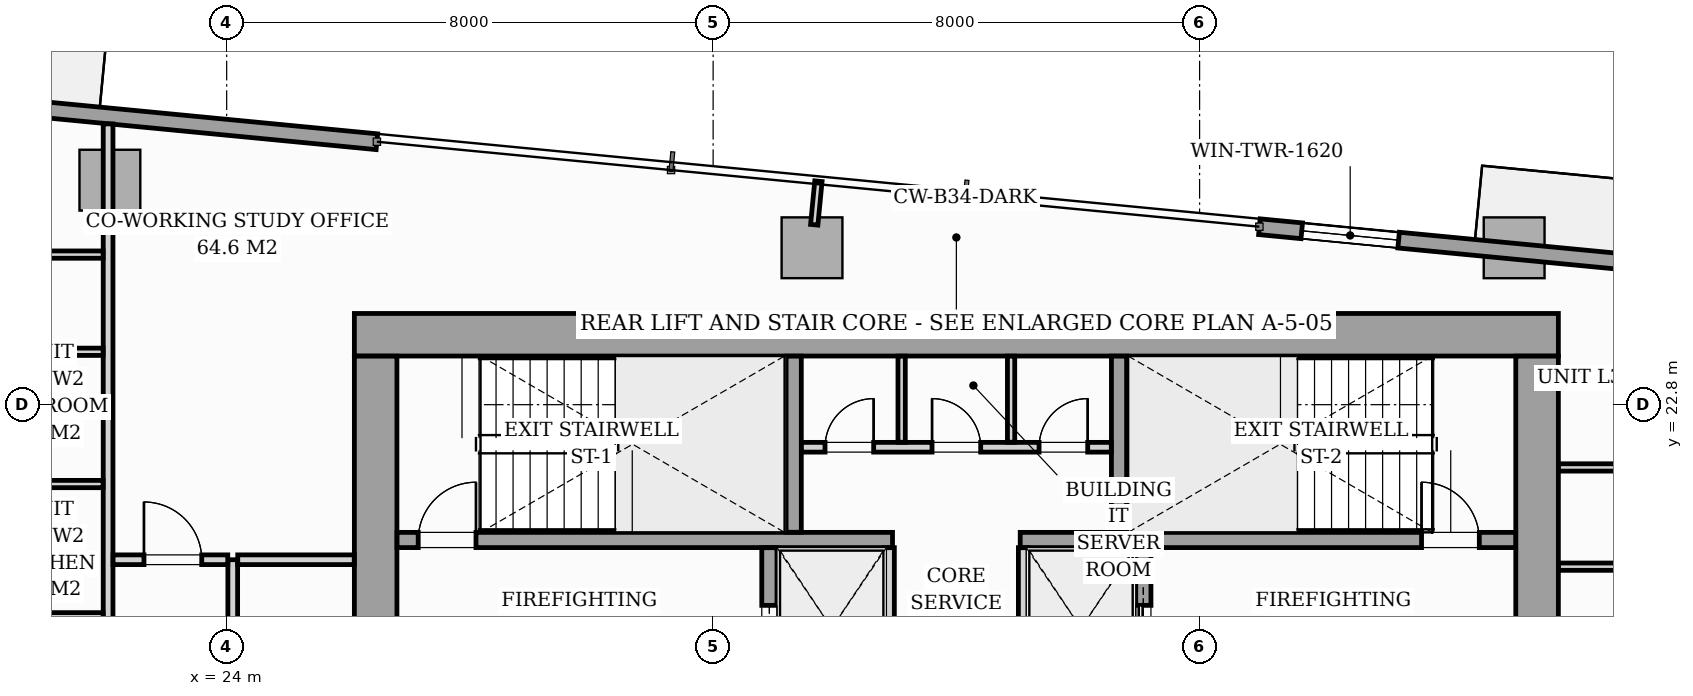
"""IFC4 building model, lengths in metres.
Left out: names, types, materials, properties, quantities, classifications, styles, units other than length and angle.
Written with IfcOpenShell. Run it as: python <this file> out.ifc"""

import sys

from ifc_helpers import new_model, si_unit, direction, frame, frame_2d, origin, origin_2d, place, context, subcontext, project, spatial, rectangle, i_section, extrude, source, transform, mapped, element, fill, save


model = new_model("IFC4")
c1 = context("Model", 3, precision=1e-05, world=origin(), true_north=direction((0.0, 1.0)))
c2 = subcontext(c1, "Body", "Model", "MODEL_VIEW")
j1 = project(units=[si_unit("LENGTHUNIT", "METRE"), si_unit("PLANEANGLEUNIT", "RADIAN")], contexts=[c1])
p1 = place(None, origin())
s1 = spatial("IfcSite", under=j1, at=p1, CompositionType="ELEMENT")
p2 = place(p1, origin())
s2 = spatial("IfcBuilding", under=s1, at=p2, CompositionType="ELEMENT")
p3 = place(p2, frame((0.0, 0.0, 137.4)))
s3 = spatial("IfcBuildingStorey", under=s2, at=p3, CompositionType="ELEMENT", Elevation=137.4)
m1 = source(origin(), c2, "Body", "SweptSolid", [
    extrude(i_section(OverallWidth=0.421, OverallDepth=0.465, WebThickness=0.045, FlangeThickness=0.073, FilletRadius=0.018, at=origin_2d()), origin(), (0.0, 0.0, 1.0), 3.196),
])
for number, where, z_axis, x_axis in (
    (1, (26.4, 24.0, 0.002), (0.0, 0.0, 1.0), (1.0, 0.0, 0.0)),
    (2, (33.12, 24.0, 0.002), (0.0, 0.0, 1.0), (1.0, 0.0, 0.0)),
    (3, (38.88, 24.0, 0.002), (0.0, 0.0, 1.0), (1.0, 0.0, 0.0)),
    (4, (45.6, 24.0, 0.002), (0.0, 0.0, 1.0), (1.0, 0.0, 0.0)),
):
    element("IfcColumn", number, at=place(p3, frame(where, z_axis=z_axis, x_axis=x_axis)), inside=s3, PredefinedType="PILASTER", context=c2, shape_type="MappedRepresentation", body=[
        mapped(m1, transform((0.0, 0.0, 0.0), scale=1.0)),
    ])
m2 = source(origin(), c2, "Body", "SweptSolid", [
    extrude(rectangle(XDim=1.0, YDim=1.0, at=origin_2d()), origin(), (0.0, 0.0, 1.0), 3.196),
])
for number, where, z_axis, x_axis in (
    (5, (22.08, 26.492, 0.002), (0.0, 0.0, 1.0), (0.995, -0.096, 0.0)),
    (6, (33.626, 25.38, 0.002), (0.0, 0.0, 1.0), (0.995, -0.096, 0.0)),
    (7, (45.173, 25.38, 0.002), (0.0, 0.0, 1.0), (0.995, -0.096, 0.0)),
):
    element("IfcColumn", number, at=place(p3, frame(where, z_axis=z_axis, x_axis=x_axis)), inside=s3, PredefinedType="COLUMN", context=c2, shape_type="MappedRepresentation", body=[
        mapped(m2, transform((0.0, 0.0, 0.0), scale=1.0)),
    ])
p4 = place(p3, frame((9.539, 28.754, 0.0), z_axis=(0.0, 0.0, 1.0), x_axis=(0.995397345886, -0.09583383433, 0.0)))
e8 = element("IfcWall", 8, at=p4, inside=s3, PredefinedType="STANDARD", context=c2, shape_type="SweptSolid", body=[
    extrude(rectangle(XDim=17.01, YDim=0.26, at=frame_2d((8.505, 0.0))), origin(), (0.0, 0.0, 1.0), 2.94),
])
p5 = place(p4, frame((5.759, 0.0, 0.0)))
e9 = element("IfcOpeningElement", 9, at=p5, cuts=e8, PredefinedType="OPENING", context=c2, shape_type="SweptSolid", body=[
    extrude(rectangle(XDim=1.8, YDim=2.06, at=frame_2d((0.9, 1.03))), frame((0.0, 0.14, 0.0), z_axis=(0.0, -1.0, 0.0), x_axis=(1.0, 0.0, 0.0)), (0.0, 0.0, 1.0), 0.28),
])
p6 = place(p4, frame((2.05, 0.0, 0.65)))
e10 = element("IfcOpeningElement", 10, at=p6, cuts=e8, PredefinedType="OPENING", context=c2, shape_type="SweptSolid", body=[
    extrude(rectangle(XDim=1.6, YDim=1.5, at=frame_2d((0.8, 0.75))), frame((0.0, 0.14, 0.0), z_axis=(0.0, -1.0, 0.0), x_axis=(1.0, 0.0, 0.0)), (0.0, 0.0, 1.0), 0.28),
])
p7 = place(p3, frame((40.983, 25.727, 0.0), z_axis=(0.0, 0.0, 1.0), x_axis=(0.995395844771, -0.095849424686, 0.0)))
e11 = element("IfcWall", 11, at=p7, inside=s3, PredefinedType="STANDARD", context=c2, shape_type="SweptSolid", body=[
    extrude(rectangle(XDim=17.01, YDim=0.26, at=frame_2d((8.505, 0.0))), origin(), (0.0, 0.0, 1.0), 2.94),
])
p8 = place(p7, frame((8.79, 0.0, 0.0)))
e12 = element("IfcOpeningElement", 12, at=p8, cuts=e11, PredefinedType="OPENING", context=c2, shape_type="SweptSolid", body=[
    extrude(rectangle(XDim=1.8, YDim=2.06, at=frame_2d((0.9, 1.03))), frame((0.0, 0.14, 0.0), z_axis=(0.0, -1.0, 0.0), x_axis=(1.0, 0.0, 0.0)), (0.0, 0.0, 1.0), 0.28),
])
p9 = place(p7, frame((0.7, 0.0, 0.65)))
e13 = element("IfcOpeningElement", 13, at=p9, cuts=e11, PredefinedType="OPENING", context=c2, shape_type="SweptSolid", body=[
    extrude(rectangle(XDim=1.6, YDim=1.5, at=frame_2d((0.8, 0.75))), frame((0.0, 0.14, 0.0), z_axis=(0.0, -1.0, 0.0), x_axis=(1.0, 0.0, 0.0)), (0.0, 0.0, 1.0), 0.28),
])
p10 = place(p3, frame((26.1, 23.95, 0.0), z_axis=(0.0, 0.0, 1.0), x_axis=(1.0, 0.0, 0.0)))
e14 = element("IfcWall", 14, at=p10, inside=s3, PredefinedType="SHEAR", context=c2, shape_type="SweptSolid", body=[
    extrude(rectangle(XDim=19.8, YDim=0.7, at=frame_2d((9.9, 0.0))), origin(), (0.0, 0.0, 1.0), 3.2),
])
for number, where, z_axis, x_axis in (
    (15, (26.45, 17.802, 0.0), (0.0, 0.0, 1.0), (0.0, 1.0, 0.0)),
    (16, (45.55, 17.802, 0.0), (0.0, 0.0, 1.0), (0.0, 1.0, 0.0)),
):
    element("IfcWall", number, at=place(p3, frame(where, z_axis=z_axis, x_axis=x_axis)), inside=s3, PredefinedType="SHEAR", context=c2, shape_type="SweptSolid", body=[
        extrude(rectangle(XDim=5.796, YDim=0.7, at=frame_2d((2.898, 0.0))), origin(), (0.0, 0.0, 1.0), 3.2),
    ])
p11 = place(p3, frame((26.802, 20.575, 0.0), z_axis=(0.0, 0.0, 1.0), x_axis=(1.0, 0.0, 0.0)))
e17 = element("IfcWall", 17, at=p11, inside=s3, PredefinedType="SOLIDWALL", context=c2, shape_type="SweptSolid", body=[
    extrude(rectangle(XDim=8.148, YDim=0.25, at=frame_2d((4.074, 0.0))), origin(), (0.0, 0.0, 1.0), 3.2),
])
p12 = place(p11, frame((0.348, 0.0, 0.0)))
e18 = element("IfcOpeningElement", 18, at=p12, cuts=e17, PredefinedType="OPENING", context=c2, shape_type="SweptSolid", body=[
    extrude(rectangle(XDim=0.95, YDim=2.06, at=frame_2d((0.475, 1.03))), frame((0.0, 0.135, 0.0), z_axis=(0.0, -1.0, 0.0), x_axis=(1.0, 0.0, 0.0)), (0.0, 0.0, 1.0), 0.27),
])
p13 = place(p3, frame((37.05, 20.575, 0.0), z_axis=(0.0, 0.0, 1.0), x_axis=(1.0, 0.0, 0.0)))
e19 = element("IfcWall", 19, at=p13, inside=s3, PredefinedType="SOLIDWALL", context=c2, shape_type="SweptSolid", body=[
    extrude(rectangle(XDim=8.148, YDim=0.25, at=frame_2d((4.074, 0.0))), origin(), (0.0, 0.0, 1.0), 3.2),
])
p14 = place(p13, frame((6.6, 0.0, 0.0)))
e20 = element("IfcOpeningElement", 20, at=p14, cuts=e19, PredefinedType="OPENING", context=c2, shape_type="SweptSolid", body=[
    extrude(rectangle(XDim=0.95, YDim=2.06, at=frame_2d((0.475, 1.03))), frame((0.0, 0.135, 0.0), z_axis=(0.0, -1.0, 0.0), x_axis=(1.0, 0.0, 0.0)), (0.0, 0.0, 1.0), 0.27),
])
for number, where, z_axis, x_axis in (
    (21, (33.325, 20.702, 0.0), (0.0, 0.0, 1.0), (0.0, 1.0, 0.0)),
    (22, (38.675, 20.702, 0.0), (0.0, 0.0, 1.0), (0.0, 1.0, 0.0)),
):
    element("IfcWall", number, at=place(p3, frame(where, z_axis=z_axis, x_axis=x_axis)), inside=s3, PredefinedType="SOLIDWALL", context=c2, shape_type="SweptSolid", body=[
        extrude(rectangle(XDim=2.896, YDim=0.25, at=frame_2d((1.448, 0.0))), origin(), (0.0, 0.0, 1.0), 3.2),
    ])
p15 = place(p3, frame((32.925, 17.802, 0.0), z_axis=(0.0, 0.0, 1.0), x_axis=(0.0, 1.0, 0.0)))
e23 = element("IfcWall", 23, at=p15, inside=s3, PredefinedType="SOLIDWALL", context=c2, shape_type="SweptSolid", body=[
    extrude(rectangle(XDim=2.646, YDim=0.25, at=frame_2d((1.323, 0.0))), origin(), (0.0, 0.0, 1.0), 3.2),
])
p16 = place(p15, frame((0.598, 0.0, 0.0)))
e24 = element("IfcOpeningElement", 24, at=p16, cuts=e23, PredefinedType="OPENING", context=c2, shape_type="SweptSolid", body=[
    extrude(rectangle(XDim=1.1, YDim=2.08, at=frame_2d((0.55, 1.04))), frame((0.0, 0.135, 0.0), z_axis=(0.0, -1.0, 0.0), x_axis=(1.0, 0.0, 0.0)), (0.0, 0.0, 1.0), 0.27),
])
for number, where, z_axis, x_axis in (
    (25, (34.9, 17.802, 0.0), (0.0, 0.0, 1.0), (0.0, 1.0, 0.0)),
    (26, (37.1, 17.802, 0.0), (0.0, 0.0, 1.0), (0.0, 1.0, 0.0)),
):
    element("IfcWall", number, at=place(p3, frame(where, z_axis=z_axis, x_axis=x_axis)), inside=s3, PredefinedType="PARTITIONING", context=c2, shape_type="SweptSolid", body=[
        extrude(rectangle(XDim=2.646, YDim=0.16, at=frame_2d((1.323, 0.0))), origin(), (0.0, 0.0, 1.0), 2.94),
    ])
p17 = place(p3, frame((39.075, 17.802, 0.0), z_axis=(0.0, 0.0, 1.0), x_axis=(0.0, 1.0, 0.0)))
e27 = element("IfcWall", 27, at=p17, inside=s3, PredefinedType="SOLIDWALL", context=c2, shape_type="SweptSolid", body=[
    extrude(rectangle(XDim=2.646, YDim=0.25, at=frame_2d((1.323, 0.0))), origin(), (0.0, 0.0, 1.0), 3.2),
])
p18 = place(p17, frame((0.598, 0.0, 0.0)))
e28 = element("IfcOpeningElement", 28, at=p18, cuts=e27, PredefinedType="OPENING", context=c2, shape_type="SweptSolid", body=[
    extrude(rectangle(XDim=1.1, YDim=2.08, at=frame_2d((0.55, 1.04))), frame((0.0, 0.135, 0.0), z_axis=(0.0, -1.0, 0.0), x_axis=(1.0, 0.0, 0.0)), (0.0, 0.0, 1.0), 0.27),
])
p19 = place(p3, frame((33.452, 22.1, 0.0), z_axis=(0.0, 0.0, 1.0), x_axis=(1.0, 0.0, 0.0)))
e29 = element("IfcWall", 29, at=p19, inside=s3, PredefinedType="PARTITIONING", context=c2, shape_type="SweptSolid", body=[
    extrude(rectangle(XDim=5.096, YDim=0.16, at=frame_2d((2.548, 0.0))), origin(), (0.0, 0.0, 1.0), 2.94),
])
p20 = place(p19, frame((0.388, 0.0, 0.0)))
e30 = element("IfcOpeningElement", 30, at=p20, cuts=e29, PredefinedType="OPENING", context=c2, shape_type="SweptSolid", body=[
    extrude(rectangle(XDim=0.8, YDim=2.05, at=frame_2d((0.4, 1.025))), frame((0.0, 0.09, 0.0), z_axis=(0.0, -1.0, 0.0), x_axis=(1.0, 0.0, 0.0)), (0.0, 0.0, 1.0), 0.18),
])
p21 = place(p19, frame((2.148, 0.0, 0.0)))
e31 = element("IfcOpeningElement", 31, at=p21, cuts=e29, PredefinedType="OPENING", context=c2, shape_type="SweptSolid", body=[
    extrude(rectangle(XDim=0.8, YDim=2.05, at=frame_2d((0.4, 1.025))), frame((0.0, 0.09, 0.0), z_axis=(0.0, -1.0, 0.0), x_axis=(1.0, 0.0, 0.0)), (0.0, 0.0, 1.0), 0.18),
])
p22 = place(p19, frame((3.908, 0.0, 0.0)))
e32 = element("IfcOpeningElement", 32, at=p22, cuts=e29, PredefinedType="OPENING", context=c2, shape_type="SweptSolid", body=[
    extrude(rectangle(XDim=0.8, YDim=2.05, at=frame_2d((0.4, 1.025))), frame((0.0, 0.09, 0.0), z_axis=(0.0, -1.0, 0.0), x_axis=(1.0, 0.0, 0.0)), (0.0, 0.0, 1.0), 0.18),
])
for number, where, z_axis, x_axis in (
    (33, (35.1, 22.182, 0.0), (0.0, 0.0, 1.0), (0.0, 1.0, 0.0)),
    (34, (36.9, 22.182, 0.0), (0.0, 0.0, 1.0), (0.0, 1.0, 0.0)),
):
    element("IfcWall", number, at=place(p3, frame(where, z_axis=z_axis, x_axis=x_axis)), inside=s3, PredefinedType="PARTITIONING", context=c2, shape_type="SweptSolid", body=[
        extrude(rectangle(XDim=1.416, YDim=0.12, at=frame_2d((0.708, 0.0))), origin(), (0.0, 0.0, 1.0), 2.94),
    ])
p23 = place(p3, frame((22.05, 12.732, 0.0), z_axis=(0.0, 0.0, 1.0), x_axis=(0.0, 1.0, 0.0)))
e35 = element("IfcWall", 35, at=p23, inside=s3, PredefinedType="PARTITIONING", context=c2, shape_type="SweptSolid", body=[
    extrude(rectangle(XDim=14.685, YDim=0.16, at=frame_2d((7.343, 0.0))), origin(), (0.0, 0.0, 1.0), 2.94),
])
p24 = place(p23, frame((0.493, 0.0, 0.0)))
e36 = element("IfcOpeningElement", 36, at=p24, cuts=e35, PredefinedType="OPENING", context=c2, shape_type="SweptSolid", body=[
    extrude(rectangle(XDim=0.95, YDim=2.06, at=frame_2d((0.475, 1.03))), frame((0.0, 0.09, 0.0), z_axis=(0.0, -1.0, 0.0), x_axis=(1.0, 0.0, 0.0)), (0.0, 0.0, 1.0), 0.18),
])
p25 = place(p23, frame((5.313, 0.0, 0.0)))
e37 = element("IfcOpeningElement", 37, at=p25, cuts=e35, PredefinedType="OPENING", context=c2, shape_type="SweptSolid", body=[
    extrude(rectangle(XDim=0.85, YDim=2.0, at=frame_2d((0.425, 1.0))), frame((0.0, 0.09, 0.0), z_axis=(0.0, -1.0, 0.0), x_axis=(1.0, 0.0, 0.0)), (0.0, 0.0, 1.0), 0.18),
])
for number, where, z_axis, x_axis in (
    (38, (19.712, 21.495, 0.0), (0.0, 0.0, 1.0), (1.0, 0.0, 0.0)),
    (39, (19.712, 19.32, 0.0), (0.0, 0.0, 1.0), (1.0, 0.0, 0.0)),
    (40, (19.712, 23.67, 0.0), (0.0, 0.0, 1.0), (1.0, 0.0, 0.0)),
):
    element("IfcWall", number, at=place(p3, frame(where, z_axis=z_axis, x_axis=x_axis)), inside=s3, PredefinedType="PARTITIONING", context=c2, shape_type="SweptSolid", body=[
        extrude(rectangle(XDim=2.256, YDim=0.12, at=frame_2d((1.128, 0.0))), origin(), (0.0, 0.0, 1.0), 2.94),
    ])
p26 = place(p3, frame((14.426, 25.268, 0.0), z_axis=(0.0, 0.0, 1.0), x_axis=(1.0, 0.0, 0.0)))
e41 = element("IfcWall", 41, at=p26, inside=s3, PredefinedType="PARTITIONING", context=c2, shape_type="SweptSolid", body=[
    extrude(rectangle(XDim=7.542, YDim=0.12, at=frame_2d((3.771, 0.0))), origin(), (0.0, 0.0, 1.0), 2.94),
])
p27 = place(p26, frame((3.316, 0.0, 0.0)))
e42 = element("IfcOpeningElement", 42, at=p27, cuts=e41, PredefinedType="OPENING", context=c2, shape_type="SweptSolid", body=[
    extrude(rectangle(XDim=0.85, YDim=2.05, at=frame_2d((0.425, 1.025))), frame((0.0, 0.07, 0.0), z_axis=(0.0, -1.0, 0.0), x_axis=(1.0, 0.0, 0.0)), (0.0, 0.0, 1.0), 0.14),
])
p28 = place(p3, frame((45.902, 21.768, 0.0), z_axis=(0.0, 0.0, 1.0), x_axis=(1.0, 0.0, 0.0)))
e43 = element("IfcWall", 43, at=p28, inside=s3, PredefinedType="PARTITIONING", context=c2, shape_type="SweptSolid", body=[
    extrude(rectangle(XDim=12.781, YDim=0.12, at=frame_2d((6.391, 0.0))), origin(), (0.0, 0.0, 1.0), 2.94),
])
p29 = place(p28, frame((6.146, 0.0, 0.0)))
e44 = element("IfcOpeningElement", 44, at=p29, cuts=e43, PredefinedType="OPENING", context=c2, shape_type="SweptSolid", body=[
    extrude(rectangle(XDim=0.85, YDim=2.05, at=frame_2d((0.425, 1.025))), frame((0.0, 0.07, 0.0), z_axis=(0.0, -1.0, 0.0), x_axis=(1.0, 0.0, 0.0)), (0.0, 0.0, 1.0), 0.14),
])
p30 = place(p3, frame((45.902, 20.136, 0.0), z_axis=(0.0, 0.0, 1.0), x_axis=(1.0, 0.0, 0.0)))
e45 = element("IfcWall", 45, at=p30, inside=s3, PredefinedType="PARTITIONING", context=c2, shape_type="SweptSolid", body=[
    extrude(rectangle(XDim=14.063, YDim=0.12, at=frame_2d((7.031, 0.0))), origin(), (0.0, 0.0, 1.0), 2.94),
])
p31 = place(p30, frame((6.708, 0.0, 0.0)))
e46 = element("IfcOpeningElement", 46, at=p31, cuts=e45, PredefinedType="OPENING", context=c2, shape_type="SweptSolid", body=[
    extrude(rectangle(XDim=0.85, YDim=2.05, at=frame_2d((0.425, 1.025))), frame((0.0, 0.07, 0.0), z_axis=(0.0, -1.0, 0.0), x_axis=(1.0, 0.0, 0.0)), (0.0, 0.0, 1.0), 0.14),
])
p32 = place(p3, frame((24.1, 14.66, 0.0), z_axis=(0.0, 0.0, 1.0), x_axis=(0.0, 1.0, 0.0)))
e47 = element("IfcWall", 47, at=p32, inside=s3, PredefinedType="PARTITIONING", context=c2, shape_type="SweptSolid", body=[
    extrude(rectangle(XDim=5.59, YDim=0.16, at=frame_2d((2.795, 0.0))), origin(), (0.0, 0.0, 1.0), 2.94),
])
p33 = place(p32, frame((2.36, 0.0, 0.0)))
e48 = element("IfcOpeningElement", 48, at=p33, cuts=e47, PredefinedType="OPENING", context=c2, shape_type="SweptSolid", body=[
    extrude(rectangle(XDim=0.85, YDim=2.0, at=frame_2d((0.425, 1.0))), frame((0.0, 0.09, 0.0), z_axis=(0.0, -1.0, 0.0), x_axis=(1.0, 0.0, 0.0)), (0.0, 0.0, 1.0), 0.18),
])
p34 = place(p3, frame((22.132, 20.25, 0.0), z_axis=(0.0, 0.0, 1.0), x_axis=(1.0, 0.0, 0.0)))
e49 = element("IfcWall", 49, at=p34, inside=s3, PredefinedType="PARTITIONING", context=c2, shape_type="SweptSolid", body=[
    extrude(rectangle(XDim=1.886, YDim=0.16, at=frame_2d((0.943, 0.0))), origin(), (0.0, 0.0, 1.0), 2.94),
])
p35 = place(p34, frame((0.508, 0.0, 0.0)))
e50 = element("IfcOpeningElement", 50, at=p35, cuts=e49, PredefinedType="OPENING", context=c2, shape_type="SweptSolid", body=[
    extrude(rectangle(XDim=0.95, YDim=2.06, at=frame_2d((0.475, 1.03))), frame((0.0, 0.09, 0.0), z_axis=(0.0, -1.0, 0.0), x_axis=(1.0, 0.0, 0.0)), (0.0, 0.0, 1.0), 0.18),
])
p36 = place(p3, frame((24.182, 20.25, 0.0), z_axis=(0.0, 0.0, 1.0), x_axis=(1.0, 0.0, 0.0)))
e51 = element("IfcWall", 51, at=p36, inside=s3, PredefinedType="PARTITIONING", context=c2, shape_type="SweptSolid", body=[
    extrude(rectangle(XDim=1.916, YDim=0.16, at=frame_2d((0.958, 0.0))), origin(), (0.0, 0.0, 1.0), 2.94),
])
p37 = place(p3, frame((33.663, 25.759, 0.0), z_axis=(0.0, 0.0, 1.0), x_axis=(0.095977354523, 0.995383517755, 0.0)))
e52 = element("IfcWall", 52, at=p37, inside=s3, PredefinedType="PARTITIONING", context=c2, shape_type="SweptSolid", body=[
    extrude(rectangle(XDim=0.72, YDim=0.12, at=frame_2d((0.36, 0.0))), origin(), (0.0, 0.0, 1.0), 2.94),
])
m3 = source(origin(), c2, "Body", "SweptSolid", [
    extrude(rectangle(XDim=1.6, YDim=1.5, at=frame_2d((0.8, 0.75))), frame((0.0, 0.03, 0.0), z_axis=(0.0, -1.0, 0.0), x_axis=(1.0, 0.0, 0.0)), (0.0, 0.0, 1.0), 0.06),
])
p38 = place(p9, origin())
e53 = element("IfcWindow", 53, at=p38, inside=s3, PartitioningType="SINGLE_PANEL", PredefinedType="WINDOW", context=c2, shape_type="MappedRepresentation", body=[
    mapped(m3, transform((0.0, 0.0, 0.0), scale=1.0)),
])
fill(e13, e53)
m4 = source(origin(), c2, "Body", "SweptSolid", [
    extrude(rectangle(XDim=0.95, YDim=2.06, at=frame_2d((0.475, 1.03))), frame((0.0, 0.025, 0.0), z_axis=(0.0, -1.0, 0.0), x_axis=(1.0, 0.0, 0.0)), (0.0, 0.0, 1.0), 0.05),
])
p39 = place(p12, origin())
e54 = element("IfcDoor", 54, at=p39, inside=s3, OperationType="SINGLE_SWING_RIGHT", PredefinedType="DOOR", context=c2, shape_type="MappedRepresentation", body=[
    mapped(m4, transform((0.0, 0.0, 0.0), scale=1.0)),
])
fill(e18, e54)
p40 = place(p14, origin())
e55 = element("IfcDoor", 55, at=p40, inside=s3, OperationType="SINGLE_SWING_LEFT", PredefinedType="DOOR", context=c2, shape_type="MappedRepresentation", body=[
    mapped(m4, transform((0.0, 0.0, 0.0), scale=1.0)),
])
fill(e20, e55)
m5 = source(origin(), c2, "Body", "SweptSolid", [
    extrude(rectangle(XDim=1.1, YDim=2.08, at=frame_2d((0.55, 1.04))), frame((0.0, 0.025, 0.0), z_axis=(0.0, -1.0, 0.0), x_axis=(1.0, 0.0, 0.0)), (0.0, 0.0, 1.0), 0.05),
])
p41 = place(p16, origin())
e56 = element("IfcDoor", 56, at=p41, inside=s3, OperationType="SLIDING_TO_LEFT", PredefinedType="DOOR", context=c2, shape_type="MappedRepresentation", body=[
    mapped(m5, transform((0.0, 0.0, 0.0), scale=1.0)),
])
fill(e24, e56)
p42 = place(p18, origin())
e57 = element("IfcDoor", 57, at=p42, inside=s3, OperationType="SLIDING_TO_RIGHT", PredefinedType="DOOR", context=c2, shape_type="MappedRepresentation", body=[
    mapped(m5, transform((0.0, 0.0, 0.0), scale=1.0)),
])
fill(e28, e57)
m6 = source(origin(), c2, "Body", "SweptSolid", [
    extrude(rectangle(XDim=0.8, YDim=2.05, at=frame_2d((0.4, 1.025))), frame((0.0, 0.025, 0.0), z_axis=(0.0, -1.0, 0.0), x_axis=(1.0, 0.0, 0.0)), (0.0, 0.0, 1.0), 0.05),
])
p43 = place(p20, origin())
e58 = element("IfcDoor", 58, at=p43, inside=s3, OperationType="SINGLE_SWING_RIGHT", PredefinedType="DOOR", context=c2, shape_type="MappedRepresentation", body=[
    mapped(m6, transform((0.0, 0.0, 0.0), scale=1.0)),
])
fill(e30, e58)
p44 = place(p21, origin())
e59 = element("IfcDoor", 59, at=p44, inside=s3, OperationType="SINGLE_SWING_LEFT", PredefinedType="DOOR", context=c2, shape_type="MappedRepresentation", body=[
    mapped(m6, transform((0.0, 0.0, 0.0), scale=1.0)),
])
fill(e31, e59)
p45 = place(p22, origin())
e60 = element("IfcDoor", 60, at=p45, inside=s3, OperationType="SINGLE_SWING_RIGHT", PredefinedType="DOOR", context=c2, shape_type="MappedRepresentation", body=[
    mapped(m6, transform((0.0, 0.0, 0.0), scale=1.0)),
])
fill(e32, e60)
m7 = source(origin(), c2, "Body", "SweptSolid", [
    extrude(rectangle(XDim=0.95, YDim=2.06, at=frame_2d((0.475, 1.03))), frame((0.0, 0.025, 0.0), z_axis=(0.0, -1.0, 0.0), x_axis=(1.0, 0.0, 0.0)), (0.0, 0.0, 1.0), 0.05),
])
p46 = place(p35, origin())
e61 = element("IfcDoor", 61, at=p46, inside=s3, OperationType="SINGLE_SWING_LEFT", PredefinedType="DOOR", context=c2, shape_type="MappedRepresentation", body=[
    mapped(m7, transform((0.0, 0.0, 0.0), scale=1.0)),
])
fill(e50, e61)
save(model, sys.argv[1])
